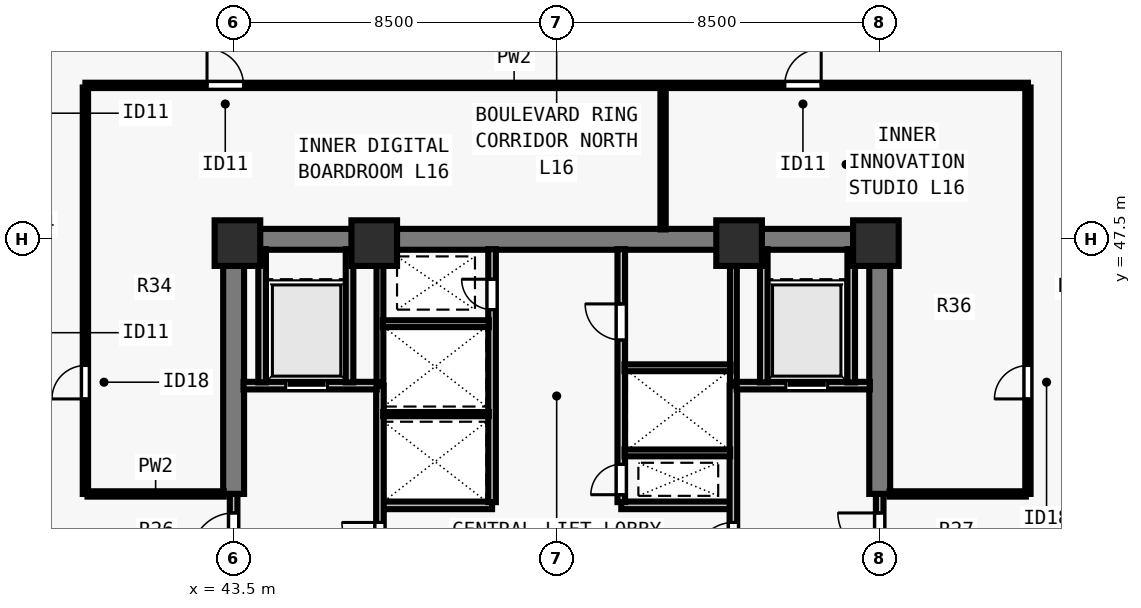
"""IFC4 building model, lengths in metres.
Left out: names, types, materials, properties, quantities, classifications, styles, units other than length and angle.
Written with IfcOpenShell. Run it as: python <this file> out.ifc"""

import sys

from ifc_helpers import new_model, si_unit, direction, frame, frame_2d, origin, origin_2d, place, context, subcontext, project, spatial, rectangle, extrude, element, fill, save


model = new_model("IFC4")
c1 = context("Model", 3, precision=1e-05, world=origin(), true_north=direction((0.0, 1.0)))
c2 = subcontext(c1, "Body", "Model", "MODEL_VIEW")
j1 = project(units=[si_unit("LENGTHUNIT", "METRE"), si_unit("PLANEANGLEUNIT", "RADIAN")], contexts=[c1])
p1 = place(None, origin())
s1 = spatial("IfcSite", under=j1, at=p1, CompositionType="ELEMENT")
p2 = place(p1, origin())
s2 = spatial("IfcBuilding", under=s1, at=p2, CompositionType="ELEMENT")
p3 = place(p2, frame((0.0, 0.0, 62.0)))
s3 = spatial("IfcBuildingStorey", under=s2, at=p3, CompositionType="ELEMENT", Elevation=62.0)
for number, where, z_axis, x_axis in (
    (1, (43.6, 47.4, 0.0), (0.0, 0.0, 1.0), (1.0, 0.0, 0.0)),
    (2, (47.2, 47.4, 0.0), (0.0, 0.0, 1.0), (1.0, 0.0, 0.0)),
    (3, (56.8, 47.4, 0.0), (0.0, 0.0, 1.0), (1.0, 0.0, 0.0)),
    (4, (60.4, 47.4, 0.0), (0.0, 0.0, 1.0), (1.0, 0.0, 0.0)),
):
    element("IfcColumn", number, at=place(p3, frame(where, z_axis=z_axis, x_axis=x_axis)), inside=s3, PredefinedType="COLUMN", context=c2, shape_type="SweptSolid", body=[
        extrude(rectangle(XDim=1.2, YDim=1.2, at=origin_2d()), origin(), (0.0, 0.0, 1.0), 3.5),
    ])
p4 = place(p3, frame((43.225, 47.5, 0.0), z_axis=(0.0, 0.0, 1.0), x_axis=(1.0, 0.0, 0.0)))
e5 = element("IfcWall", 5, at=p4, inside=s3, PredefinedType="SHEAR", context=c2, shape_type="SweptSolid", body=[
    extrude(rectangle(XDim=17.55, YDim=0.55, at=frame_2d((8.775, 0.0))), origin(), (0.0, 0.0, 1.0), 3.28),
])
for number, where, z_axis, x_axis in (
    (6, (43.5, 40.8, 0.0), (0.0, 0.0, 1.0), (0.0, 1.0, 0.0)),
    (7, (60.5, 40.8, 0.0), (0.0, 0.0, 1.0), (0.0, 1.0, 0.0)),
):
    element("IfcWall", number, at=place(p3, frame(where, z_axis=z_axis, x_axis=x_axis)), inside=s3, PredefinedType="SHEAR", context=c2, shape_type="SweptSolid", body=[
        extrude(rectangle(XDim=6.435, YDim=0.55, at=frame_2d((3.218, 0.0))), origin(), (0.0, 0.0, 1.0), 3.28),
    ])
for number, where, z_axis, x_axis in (
    (8, (47.35, 40.5, 0.0), (0.0, 0.0, 1.0), (1.0, 0.0, 0.0)),
    (9, (53.7, 40.5, 0.0), (0.0, 0.0, 1.0), (1.0, 0.0, 0.0)),
):
    element("IfcWall", number, at=place(p3, frame(where, z_axis=z_axis, x_axis=x_axis)), inside=s3, PredefinedType="SOLIDWALL", context=c2, shape_type="SweptSolid", body=[
        extrude(rectangle(XDim=2.95, YDim=0.2, at=frame_2d((1.475, 0.0))), origin(), (0.0, 0.0, 1.0), 3.28),
    ])
p5 = place(p3, frame((50.3, 40.585, 0.0), z_axis=(0.0, 0.0, 1.0), x_axis=(0.0, 1.0, 0.0)))
e10 = element("IfcWall", 10, at=p5, inside=s3, PredefinedType="SOLIDWALL", context=c2, shape_type="SweptSolid", body=[
    extrude(rectangle(XDim=6.655, YDim=0.2, at=frame_2d((3.328, 0.0))), origin(), (0.0, 0.0, 1.0), 3.28),
])
p6 = place(p5, frame((5.065, 0.0, 0.0)))
e11 = element("IfcOpeningElement", 11, at=p6, cuts=e10, PredefinedType="OPENING", context=c2, shape_type="SweptSolid", body=[
    extrude(rectangle(XDim=0.8, YDim=2.08, at=frame_2d((0.4, 1.04))), frame((0.0, 0.11, 0.0), z_axis=(0.0, -1.0, 0.0), x_axis=(1.0, 0.0, 0.0)), (0.0, 0.0, 1.0), 0.22),
])
p7 = place(p3, frame((53.7, 40.585, 0.0), z_axis=(0.0, 0.0, 1.0), x_axis=(0.0, 1.0, 0.0)))
e12 = element("IfcWall", 12, at=p7, inside=s3, PredefinedType="SOLIDWALL", context=c2, shape_type="SweptSolid", body=[
    extrude(rectangle(XDim=6.655, YDim=0.2, at=frame_2d((3.328, 0.0))), origin(), (0.0, 0.0, 1.0), 3.28),
])
p8 = place(p7, frame((0.195, 0.0, 0.0)))
e13 = element("IfcOpeningElement", 13, at=p8, cuts=e12, PredefinedType="OPENING", context=c2, shape_type="SweptSolid", body=[
    extrude(rectangle(XDim=0.8, YDim=2.08, at=frame_2d((0.4, 1.04))), frame((0.0, 0.11, 0.0), z_axis=(0.0, -1.0, 0.0), x_axis=(1.0, 0.0, 0.0)), (0.0, 0.0, 1.0), 0.22),
])
p9 = place(p7, frame((4.265, 0.0, 0.0)))
e14 = element("IfcOpeningElement", 14, at=p9, cuts=e12, PredefinedType="OPENING", context=c2, shape_type="SweptSolid", body=[
    extrude(rectangle(XDim=0.95, YDim=2.12, at=frame_2d((0.475, 1.06))), frame((0.0, 0.11, 0.0), z_axis=(0.0, -1.0, 0.0), x_axis=(1.0, 0.0, 0.0)), (0.0, 0.0, 1.0), 0.22),
])
p10 = place(p3, frame((43.5, 38.75, 0.0), z_axis=(0.0, 0.0, 1.0), x_axis=(0.0, 1.0, 0.0)))
e15 = element("IfcWall", 15, at=p10, inside=s3, PredefinedType="SOLIDWALL", context=c2, shape_type="SweptSolid", body=[
    extrude(rectangle(XDim=2.05, YDim=0.2, at=frame_2d((1.025, 0.0))), origin(), (0.0, 0.0, 1.0), 3.28),
])
p11 = place(p10, frame((0.45, 0.0, 0.0)))
e16 = element("IfcOpeningElement", 16, at=p11, cuts=e15, PredefinedType="OPENING", context=c2, shape_type="SweptSolid", body=[
    extrude(rectangle(XDim=1.1, YDim=2.15, at=frame_2d((0.55, 1.075))), frame((0.0, 0.11, 0.0), z_axis=(0.0, -1.0, 0.0), x_axis=(1.0, 0.0, 0.0)), (0.0, 0.0, 1.0), 0.22),
])
p12 = place(p3, frame((47.35, 38.785, 0.0), z_axis=(0.0, 0.0, 1.0), x_axis=(0.0, 1.0, 0.0)))
e17 = element("IfcWall", 17, at=p12, inside=s3, PredefinedType="SOLIDWALL", context=c2, shape_type="SweptSolid", body=[
    extrude(rectangle(XDim=4.865, YDim=0.2, at=frame_2d((2.433, 0.0))), origin(), (0.0, 0.0, 1.0), 3.28),
])
p13 = place(p12, frame((0.265, 0.0, 0.0)))
e18 = element("IfcOpeningElement", 18, at=p13, cuts=e17, PredefinedType="OPENING", context=c2, shape_type="SweptSolid", body=[
    extrude(rectangle(XDim=1.0, YDim=2.15, at=frame_2d((0.5, 1.075))), frame((0.0, 0.11, 0.0), z_axis=(0.0, -1.0, 0.0), x_axis=(1.0, 0.0, 0.0)), (0.0, 0.0, 1.0), 0.22),
])
p14 = place(p3, frame((43.76, 43.65, 0.0), z_axis=(0.0, 0.0, 1.0), x_axis=(1.0, 0.0, 0.0)))
e19 = element("IfcWall", 19, at=p14, inside=s3, PredefinedType="SOLIDWALL", context=c2, shape_type="SweptSolid", body=[
    extrude(rectangle(XDim=3.505, YDim=0.2, at=frame_2d((1.752, 0.0))), origin(), (0.0, 0.0, 1.0), 3.28),
])
p15 = place(p14, frame((1.11, 0.0, 0.0)))
e20 = element("IfcOpeningElement", 20, at=p15, cuts=e19, PredefinedType="OPENING", context=c2, shape_type="SweptSolid", body=[
    extrude(rectangle(XDim=1.1, YDim=2.2, at=frame_2d((0.55, 1.1))), frame((0.0, 0.11, 0.0), z_axis=(0.0, -1.0, 0.0), x_axis=(1.0, 0.0, 0.0)), (0.0, 0.0, 1.0), 0.22),
])
for number, where, z_axis, x_axis in (
    (21, (46.55, 43.735, 0.0), (0.0, 0.0, 1.0), (0.0, 1.0, 0.0)),
    (22, (44.25, 43.735, 0.0), (0.0, 0.0, 1.0), (0.0, 1.0, 0.0)),
):
    element("IfcWall", number, at=place(p3, frame(where, z_axis=z_axis, x_axis=x_axis)), inside=s3, PredefinedType="SOLIDWALL", context=c2, shape_type="SweptSolid", body=[
        extrude(rectangle(XDim=3.505, YDim=0.2, at=frame_2d((1.752, 0.0))), origin(), (0.0, 0.0, 1.0), 3.28),
    ])
p16 = place(p3, frame((60.5, 38.75, 0.0), z_axis=(0.0, 0.0, 1.0), x_axis=(0.0, 1.0, 0.0)))
e23 = element("IfcWall", 23, at=p16, inside=s3, PredefinedType="SOLIDWALL", context=c2, shape_type="SweptSolid", body=[
    extrude(rectangle(XDim=2.05, YDim=0.2, at=frame_2d((1.025, 0.0))), origin(), (0.0, 0.0, 1.0), 3.28),
])
p17 = place(p16, frame((0.45, 0.0, 0.0)))
e24 = element("IfcOpeningElement", 24, at=p17, cuts=e23, PredefinedType="OPENING", context=c2, shape_type="SweptSolid", body=[
    extrude(rectangle(XDim=1.1, YDim=2.15, at=frame_2d((0.55, 1.075))), frame((0.0, 0.11, 0.0), z_axis=(0.0, -1.0, 0.0), x_axis=(1.0, 0.0, 0.0)), (0.0, 0.0, 1.0), 0.22),
])
p18 = place(p3, frame((56.65, 38.785, 0.0), z_axis=(0.0, 0.0, 1.0), x_axis=(0.0, 1.0, 0.0)))
e25 = element("IfcWall", 25, at=p18, inside=s3, PredefinedType="SOLIDWALL", context=c2, shape_type="SweptSolid", body=[
    extrude(rectangle(XDim=4.865, YDim=0.2, at=frame_2d((2.433, 0.0))), origin(), (0.0, 0.0, 1.0), 3.28),
])
p19 = place(p18, frame((0.265, 0.0, 0.0)))
e26 = element("IfcOpeningElement", 26, at=p19, cuts=e25, PredefinedType="OPENING", context=c2, shape_type="SweptSolid", body=[
    extrude(rectangle(XDim=1.0, YDim=2.15, at=frame_2d((0.5, 1.075))), frame((0.0, 0.11, 0.0), z_axis=(0.0, -1.0, 0.0), x_axis=(1.0, 0.0, 0.0)), (0.0, 0.0, 1.0), 0.22),
])
p20 = place(p3, frame((56.735, 43.65, 0.0), z_axis=(0.0, 0.0, 1.0), x_axis=(1.0, 0.0, 0.0)))
e27 = element("IfcWall", 27, at=p20, inside=s3, PredefinedType="SOLIDWALL", context=c2, shape_type="SweptSolid", body=[
    extrude(rectangle(XDim=3.505, YDim=0.2, at=frame_2d((1.752, 0.0))), origin(), (0.0, 0.0, 1.0), 3.28),
])
p21 = place(p20, frame((1.295, 0.0, 0.0)))
e28 = element("IfcOpeningElement", 28, at=p21, cuts=e27, PredefinedType="OPENING", context=c2, shape_type="SweptSolid", body=[
    extrude(rectangle(XDim=1.1, YDim=2.2, at=frame_2d((0.55, 1.1))), frame((0.0, 0.11, 0.0), z_axis=(0.0, -1.0, 0.0), x_axis=(1.0, 0.0, 0.0)), (0.0, 0.0, 1.0), 0.22),
])
for number, where, z_axis, x_axis in (
    (29, (57.45, 43.735, 0.0), (0.0, 0.0, 1.0), (0.0, 1.0, 0.0)),
    (30, (59.75, 43.735, 0.0), (0.0, 0.0, 1.0), (0.0, 1.0, 0.0)),
):
    element("IfcWall", number, at=place(p3, frame(where, z_axis=z_axis, x_axis=x_axis)), inside=s3, PredefinedType="SOLIDWALL", context=c2, shape_type="SweptSolid", body=[
        extrude(rectangle(XDim=3.505, YDim=0.2, at=frame_2d((1.752, 0.0))), origin(), (0.0, 0.0, 1.0), 3.28),
    ])
p22 = place(p3, frame((47.35, 43.735, 0.0), z_axis=(0.0, 0.0, 1.0), x_axis=(0.0, 1.0, 0.0)))
e31 = element("IfcWall", 31, at=p22, inside=s3, PredefinedType="SOLIDWALL", context=c2, shape_type="SweptSolid", body=[
    extrude(rectangle(XDim=3.505, YDim=0.18, at=frame_2d((1.752, 0.0))), origin(), (0.0, 0.0, 1.0), 3.28),
])
p23 = place(p3, frame((47.435, 42.9, 0.0), z_axis=(0.0, 0.0, 1.0), x_axis=(1.0, 0.0, 0.0)))
e32 = element("IfcWall", 32, at=p23, inside=s3, PredefinedType="PARTITIONING", context=c2, shape_type="SweptSolid", body=[
    extrude(rectangle(XDim=2.78, YDim=0.11, at=frame_2d((1.39, 0.0))), origin(), (0.0, 0.0, 1.0), 3.28),
])
p24 = place(p3, frame((47.425, 45.28, 0.0), z_axis=(0.0, 0.0, 1.0), x_axis=(1.0, 0.0, 0.0)))
e33 = element("IfcWall", 33, at=p24, inside=s3, PredefinedType="SOLIDWALL", context=c2, shape_type="SweptSolid", body=[
    extrude(rectangle(XDim=2.79, YDim=0.18, at=frame_2d((1.395, 0.0))), origin(), (0.0, 0.0, 1.0), 3.28),
])
p25 = place(p3, frame((56.65, 43.735, 0.0), z_axis=(0.0, 0.0, 1.0), x_axis=(0.0, 1.0, 0.0)))
e34 = element("IfcWall", 34, at=p25, inside=s3, PredefinedType="SOLIDWALL", context=c2, shape_type="SweptSolid", body=[
    extrude(rectangle(XDim=3.505, YDim=0.18, at=frame_2d((1.752, 0.0))), origin(), (0.0, 0.0, 1.0), 3.28),
])
p26 = place(p3, frame((53.785, 41.88, 0.0), z_axis=(0.0, 0.0, 1.0), x_axis=(1.0, 0.0, 0.0)))
e35 = element("IfcWall", 35, at=p26, inside=s3, PredefinedType="SOLIDWALL", context=c2, shape_type="SweptSolid", body=[
    extrude(rectangle(XDim=2.78, YDim=0.18, at=frame_2d((1.39, 0.0))), origin(), (0.0, 0.0, 1.0), 3.28),
])
p27 = place(p3, frame((53.785, 44.12, 0.0), z_axis=(0.0, 0.0, 1.0), x_axis=(1.0, 0.0, 0.0)))
e36 = element("IfcWall", 36, at=p27, inside=s3, PredefinedType="SOLIDWALL", context=c2, shape_type="SweptSolid", body=[
    extrude(rectangle(XDim=2.79, YDim=0.18, at=frame_2d((1.395, 0.0))), origin(), (0.0, 0.0, 1.0), 3.28),
])
p28 = place(p3, frame((39.6, 51.55, 0.0), z_axis=(0.0, 0.0, 1.0), x_axis=(1.0, 0.0, 0.0)))
e37 = element("IfcWall", 37, at=p28, inside=s3, PredefinedType="PARTITIONING", context=c2, shape_type="SweptSolid", body=[
    extrude(rectangle(XDim=24.8, YDim=0.14, at=frame_2d((12.4, 0.0))), origin(), (0.0, 0.0, 1.0), 3.28),
])
p29 = place(p28, frame((3.2, 0.0, 0.0)))
e38 = element("IfcOpeningElement", 38, at=p29, cuts=e37, PredefinedType="OPENING", context=c2, shape_type="SweptSolid", body=[
    extrude(rectangle(XDim=0.96, YDim=2.12, at=frame_2d((0.48, 1.06))), frame((0.0, 0.08, 0.0), z_axis=(0.0, -1.0, 0.0), x_axis=(1.0, 0.0, 0.0)), (0.0, 0.0, 1.0), 0.16),
])
p30 = place(p28, frame((18.4, 0.0, 0.0)))
e39 = element("IfcOpeningElement", 39, at=p30, cuts=e37, PredefinedType="OPENING", context=c2, shape_type="SweptSolid", body=[
    extrude(rectangle(XDim=0.96, YDim=2.12, at=frame_2d((0.48, 1.06))), frame((0.0, 0.08, 0.0), z_axis=(0.0, -1.0, 0.0), x_axis=(1.0, 0.0, 0.0)), (0.0, 0.0, 1.0), 0.16),
])
p31 = place(p3, frame((39.6, 40.8, 0.0), z_axis=(0.0, 0.0, 1.0), x_axis=(0.0, 1.0, 0.0)))
e40 = element("IfcWall", 40, at=p31, inside=s3, PredefinedType="PARTITIONING", context=c2, shape_type="SweptSolid", body=[
    extrude(rectangle(XDim=10.695, YDim=0.14, at=frame_2d((5.348, 0.0))), origin(), (0.0, 0.0, 1.0), 3.28),
])
p32 = place(p31, frame((2.5, 0.0, 0.0)))
e41 = element("IfcOpeningElement", 41, at=p32, cuts=e40, PredefinedType="OPENING", context=c2, shape_type="SweptSolid", body=[
    extrude(rectangle(XDim=0.88, YDim=2.1, at=frame_2d((0.44, 1.05))), frame((0.0, 0.08, 0.0), z_axis=(0.0, -1.0, 0.0), x_axis=(1.0, 0.0, 0.0)), (0.0, 0.0, 1.0), 0.16),
])
p33 = place(p3, frame((39.655, 40.8, 0.0), z_axis=(0.0, 0.0, 1.0), x_axis=(1.0, 0.0, 0.0)))
e42 = element("IfcWall", 42, at=p33, inside=s3, PredefinedType="PARTITIONING", context=c2, shape_type="SweptSolid", body=[
    extrude(rectangle(XDim=3.585, YDim=0.14, at=frame_2d((1.792, 0.0))), origin(), (0.0, 0.0, 1.0), 3.28),
])
p34 = place(p3, frame((64.4, 40.8, 0.0), z_axis=(0.0, 0.0, 1.0), x_axis=(0.0, 1.0, 0.0)))
e43 = element("IfcWall", 43, at=p34, inside=s3, PredefinedType="PARTITIONING", context=c2, shape_type="SweptSolid", body=[
    extrude(rectangle(XDim=10.695, YDim=0.14, at=frame_2d((5.348, 0.0))), origin(), (0.0, 0.0, 1.0), 3.28),
])
p35 = place(p34, frame((2.5, 0.0, 0.0)))
e44 = element("IfcOpeningElement", 44, at=p35, cuts=e43, PredefinedType="OPENING", context=c2, shape_type="SweptSolid", body=[
    extrude(rectangle(XDim=0.88, YDim=2.1, at=frame_2d((0.44, 1.05))), frame((0.0, 0.08, 0.0), z_axis=(0.0, -1.0, 0.0), x_axis=(1.0, 0.0, 0.0)), (0.0, 0.0, 1.0), 0.16),
])
p36 = place(p3, frame((60.76, 40.8, 0.0), z_axis=(0.0, 0.0, 1.0), x_axis=(1.0, 0.0, 0.0)))
e45 = element("IfcWall", 45, at=p36, inside=s3, PredefinedType="PARTITIONING", context=c2, shape_type="SweptSolid", body=[
    extrude(rectangle(XDim=3.585, YDim=0.14, at=frame_2d((1.792, 0.0))), origin(), (0.0, 0.0, 1.0), 3.28),
])
p37 = place(p3, frame((54.8, 47.76, 0.0), z_axis=(0.0, 0.0, 1.0), x_axis=(0.0, 1.0, 0.0)))
e46 = element("IfcWall", 46, at=p37, inside=s3, PredefinedType="PARTITIONING", context=c2, shape_type="SweptSolid", body=[
    extrude(rectangle(XDim=3.735, YDim=0.14, at=frame_2d((1.868, 0.0))), origin(), (0.0, 0.0, 1.0), 3.28),
])
p38 = place(p11, origin())
e47 = element("IfcDoor", 47, at=p38, inside=s3, OperationType="SINGLE_SWING_LEFT", PredefinedType="DOOR", context=c2, shape_type="SweptSolid", body=[
    extrude(rectangle(XDim=1.1, YDim=2.15, at=frame_2d((0.55, 1.075))), frame((0.0, 0.025, 0.0), z_axis=(0.0, -1.0, 0.0), x_axis=(1.0, 0.0, 0.0)), (0.0, 0.0, 1.0), 0.05),
])
fill(e16, e47)
p39 = place(p13, origin())
e48 = element("IfcDoor", 48, at=p39, inside=s3, OperationType="SINGLE_SWING_RIGHT", PredefinedType="DOOR", context=c2, shape_type="SweptSolid", body=[
    extrude(rectangle(XDim=1.0, YDim=2.15, at=frame_2d((0.5, 1.075))), frame((0.0, 0.025, 0.0), z_axis=(0.0, -1.0, 0.0), x_axis=(1.0, 0.0, 0.0)), (0.0, 0.0, 1.0), 0.05),
])
fill(e18, e48)
p40 = place(p15, origin())
e49 = element("IfcDoor", 49, at=p40, inside=s3, OperationType="SLIDING_TO_LEFT", PredefinedType="DOOR", context=c2, shape_type="SweptSolid", body=[
    extrude(rectangle(XDim=1.1, YDim=2.2, at=frame_2d((0.55, 1.1))), frame((0.0, 0.025, 0.0), z_axis=(0.0, -1.0, 0.0), x_axis=(1.0, 0.0, 0.0)), (0.0, 0.0, 1.0), 0.05),
])
fill(e20, e49)
p41 = place(p17, origin())
e50 = element("IfcDoor", 50, at=p41, inside=s3, OperationType="SINGLE_SWING_RIGHT", PredefinedType="DOOR", context=c2, shape_type="SweptSolid", body=[
    extrude(rectangle(XDim=1.1, YDim=2.15, at=frame_2d((0.55, 1.075))), frame((0.0, 0.025, 0.0), z_axis=(0.0, -1.0, 0.0), x_axis=(1.0, 0.0, 0.0)), (0.0, 0.0, 1.0), 0.05),
])
fill(e24, e50)
p42 = place(p19, origin())
e51 = element("IfcDoor", 51, at=p42, inside=s3, OperationType="SINGLE_SWING_LEFT", PredefinedType="DOOR", context=c2, shape_type="SweptSolid", body=[
    extrude(rectangle(XDim=1.0, YDim=2.15, at=frame_2d((0.5, 1.075))), frame((0.0, 0.025, 0.0), z_axis=(0.0, -1.0, 0.0), x_axis=(1.0, 0.0, 0.0)), (0.0, 0.0, 1.0), 0.05),
])
fill(e26, e51)
p43 = place(p21, origin())
e52 = element("IfcDoor", 52, at=p43, inside=s3, OperationType="SLIDING_TO_LEFT", PredefinedType="DOOR", context=c2, shape_type="SweptSolid", body=[
    extrude(rectangle(XDim=1.1, YDim=2.2, at=frame_2d((0.55, 1.1))), frame((0.0, 0.025, 0.0), z_axis=(0.0, -1.0, 0.0), x_axis=(1.0, 0.0, 0.0)), (0.0, 0.0, 1.0), 0.05),
])
fill(e28, e52)
p44 = place(p6, origin())
e53 = element("IfcDoor", 53, at=p44, inside=s3, OperationType="SINGLE_SWING_RIGHT", PredefinedType="DOOR", context=c2, shape_type="SweptSolid", body=[
    extrude(rectangle(XDim=0.8, YDim=2.08, at=frame_2d((0.4, 1.04))), frame((0.0, 0.025, 0.0), z_axis=(0.0, -1.0, 0.0), x_axis=(1.0, 0.0, 0.0)), (0.0, 0.0, 1.0), 0.05),
])
fill(e11, e53)
p45 = place(p8, origin())
e54 = element("IfcDoor", 54, at=p45, inside=s3, OperationType="SINGLE_SWING_LEFT", PredefinedType="DOOR", context=c2, shape_type="SweptSolid", body=[
    extrude(rectangle(XDim=0.8, YDim=2.08, at=frame_2d((0.4, 1.04))), frame((0.0, 0.025, 0.0), z_axis=(0.0, -1.0, 0.0), x_axis=(1.0, 0.0, 0.0)), (0.0, 0.0, 1.0), 0.05),
])
fill(e13, e54)
p46 = place(p9, origin())
e55 = element("IfcDoor", 55, at=p46, inside=s3, OperationType="SINGLE_SWING_RIGHT", PredefinedType="DOOR", context=c2, shape_type="SweptSolid", body=[
    extrude(rectangle(XDim=0.95, YDim=2.12, at=frame_2d((0.475, 1.06))), frame((0.0, 0.025, 0.0), z_axis=(0.0, -1.0, 0.0), x_axis=(1.0, 0.0, 0.0)), (0.0, 0.0, 1.0), 0.05),
])
fill(e14, e55)
p47 = place(p29, origin())
e56 = element("IfcDoor", 56, at=p47, inside=s3, OperationType="SINGLE_SWING_LEFT", PredefinedType="DOOR", context=c2, shape_type="SweptSolid", body=[
    extrude(rectangle(XDim=0.96, YDim=2.12, at=frame_2d((0.48, 1.06))), frame((0.0, 0.025, 0.0), z_axis=(0.0, -1.0, 0.0), x_axis=(1.0, 0.0, 0.0)), (0.0, 0.0, 1.0), 0.05),
])
fill(e38, e56)
p48 = place(p30, origin())
e57 = element("IfcDoor", 57, at=p48, inside=s3, OperationType="SINGLE_SWING_RIGHT", PredefinedType="DOOR", context=c2, shape_type="SweptSolid", body=[
    extrude(rectangle(XDim=0.96, YDim=2.12, at=frame_2d((0.48, 1.06))), frame((0.0, 0.025, 0.0), z_axis=(0.0, -1.0, 0.0), x_axis=(1.0, 0.0, 0.0)), (0.0, 0.0, 1.0), 0.05),
])
fill(e39, e57)
p49 = place(p32, origin())
e58 = element("IfcDoor", 58, at=p49, inside=s3, OperationType="SINGLE_SWING_LEFT", PredefinedType="DOOR", context=c2, shape_type="SweptSolid", body=[
    extrude(rectangle(XDim=0.88, YDim=2.1, at=frame_2d((0.44, 1.05))), frame((0.0, 0.025, 0.0), z_axis=(0.0, -1.0, 0.0), x_axis=(1.0, 0.0, 0.0)), (0.0, 0.0, 1.0), 0.05),
])
fill(e41, e58)
p50 = place(p35, origin())
e59 = element("IfcDoor", 59, at=p50, inside=s3, OperationType="SINGLE_SWING_LEFT", PredefinedType="DOOR", context=c2, shape_type="SweptSolid", body=[
    extrude(rectangle(XDim=0.88, YDim=2.1, at=frame_2d((0.44, 1.05))), frame((0.0, 0.025, 0.0), z_axis=(0.0, -1.0, 0.0), x_axis=(1.0, 0.0, 0.0)), (0.0, 0.0, 1.0), 0.05),
])
fill(e44, e59)
save(model, sys.argv[1])
